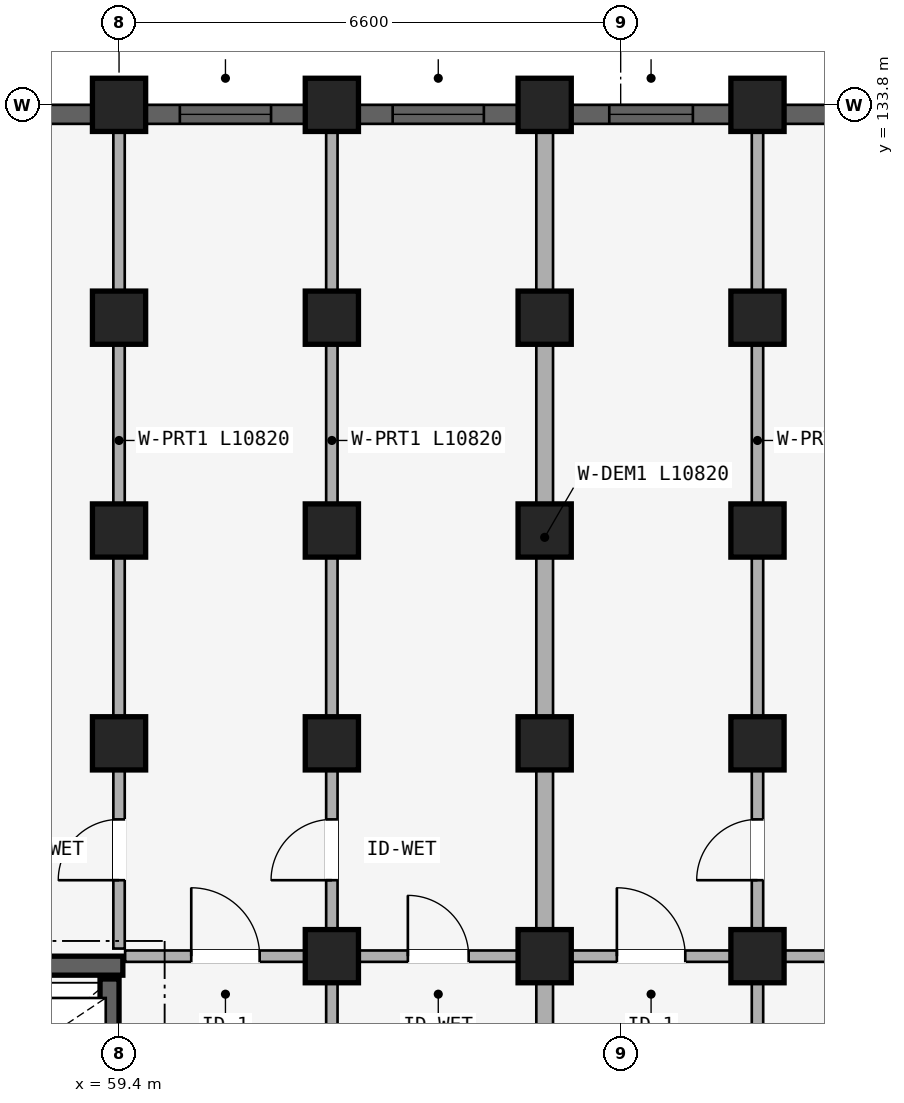
"""IFC4 building model, lengths in metres.
Left out: names, types, materials, properties, quantities, classifications, styles, units other than length and angle.
Written with IfcOpenShell. Run it as: python <this file> out.ifc"""

import sys

from ifc_helpers import new_model, si_unit, direction, frame, frame_2d, origin, origin_2d, place, context, subcontext, project, spatial, rectangle, extrude, element, fill, save


model = new_model("IFC4")
c1 = context("Model", 3, precision=1e-05, world=origin(), true_north=direction((0.0, 1.0)))
c2 = subcontext(c1, "Body", "Model", "MODEL_VIEW")
j1 = project(units=[si_unit("LENGTHUNIT", "METRE"), si_unit("PLANEANGLEUNIT", "RADIAN")], contexts=[c1])
p1 = place(None, origin())
s1 = spatial("IfcSite", under=j1, at=p1, CompositionType="ELEMENT")
p2 = place(p1, origin())
s2 = spatial("IfcBuilding", under=s1, at=p2, CompositionType="ELEMENT")
p3 = place(p2, frame((0.0, 0.0, 18.15)))
s3 = spatial("IfcBuildingStorey", under=s2, at=p3, CompositionType="ELEMENT", Elevation=18.15)
p4 = place(p3, frame((56.65, 122.475, 0.0), z_axis=(0.0, 0.0, 1.0), x_axis=(1.0, 0.0, 0.0)))
e1 = element("IfcWall", 1, at=p4, inside=s3, PredefinedType="SHEAR", context=c2, shape_type="SweptSolid", body=[
    extrude(rectangle(XDim=2.8, YDim=0.25, at=frame_2d((1.4, 0.0))), origin(), (0.0, 0.0, 1.0), 2.93),
])
p5 = place(p3, frame((59.275, 120.15, 0.0), z_axis=(0.0, 0.0, 1.0), x_axis=(0.0, 1.0, 0.0)))
e2 = element("IfcWall", 2, at=p5, inside=s3, PredefinedType="SHEAR", context=c2, shape_type="SweptSolid", body=[
    extrude(rectangle(XDim=2.15, YDim=0.25, at=frame_2d((1.075, 0.0))), origin(), (0.0, 0.0, 1.0), 2.93),
])
for number, where, z_axis, x_axis in (
    (3, (59.4, 125.4, 0.0), (0.0, 0.0, 1.0), (1.0, 0.0, 0.0)),
    (4, (59.4, 128.2, 0.0), (0.0, 0.0, 1.0), (1.0, 0.0, 0.0)),
    (5, (59.4, 131.0, 0.0), (0.0, 0.0, 1.0), (1.0, 0.0, 0.0)),
    (6, (59.4, 133.8, 0.0), (0.0, 0.0, 1.0), (1.0, 0.0, 0.0)),
    (7, (62.2, 122.6, 0.0), (0.0, 0.0, 1.0), (1.0, 0.0, 0.0)),
    (8, (62.2, 125.4, 0.0), (0.0, 0.0, 1.0), (1.0, 0.0, 0.0)),
    (9, (62.2, 128.2, 0.0), (0.0, 0.0, 1.0), (1.0, 0.0, 0.0)),
    (10, (62.2, 131.0, 0.0), (0.0, 0.0, 1.0), (1.0, 0.0, 0.0)),
    (11, (62.2, 133.8, 0.0), (0.0, 0.0, 1.0), (1.0, 0.0, 0.0)),
    (12, (65.0, 122.6, 0.0), (0.0, 0.0, 1.0), (1.0, 0.0, 0.0)),
    (13, (65.0, 125.4, 0.0), (0.0, 0.0, 1.0), (1.0, 0.0, 0.0)),
    (14, (65.0, 128.2, 0.0), (0.0, 0.0, 1.0), (1.0, 0.0, 0.0)),
    (15, (65.0, 131.0, 0.0), (0.0, 0.0, 1.0), (1.0, 0.0, 0.0)),
    (16, (65.0, 133.8, 0.0), (0.0, 0.0, 1.0), (1.0, 0.0, 0.0)),
    (17, (67.8, 122.6, 0.0), (0.0, 0.0, 1.0), (1.0, 0.0, 0.0)),
    (18, (67.8, 125.4, 0.0), (0.0, 0.0, 1.0), (1.0, 0.0, 0.0)),
    (19, (67.8, 128.2, 0.0), (0.0, 0.0, 1.0), (1.0, 0.0, 0.0)),
    (20, (67.8, 131.0, 0.0), (0.0, 0.0, 1.0), (1.0, 0.0, 0.0)),
    (21, (67.8, 133.8, 0.0), (0.0, 0.0, 1.0), (1.0, 0.0, 0.0)),
):
    element("IfcColumn", number, at=place(p3, frame(where, z_axis=z_axis, x_axis=x_axis)), inside=s3, PredefinedType="COLUMN", context=c2, shape_type="SweptSolid", body=[
        extrude(rectangle(XDim=0.7, YDim=0.7, at=origin_2d()), origin(), (0.0, 0.0, 1.0), 2.93),
    ])
p6 = place(p3, frame((59.48, 122.6, 0.0), z_axis=(0.0, 0.0, 1.0), x_axis=(1.0, 0.0, 0.0)))
e22 = element("IfcWall", 22, at=p6, inside=s3, PredefinedType="PLUMBINGWALL", context=c2, shape_type="SweptSolid", body=[
    extrude(rectangle(XDim=2.64, YDim=0.15, at=frame_2d((1.32, 0.0))), origin(), (0.0, 0.0, 1.0), 2.372),
])
p7 = place(p6, frame((0.87, 0.0, 0.0)))
e23 = element("IfcOpeningElement", 23, at=p7, cuts=e22, PredefinedType="OPENING", context=c2, shape_type="SweptSolid", body=[
    extrude(rectangle(XDim=0.9, YDim=2.1, at=frame_2d((0.45, 1.05))), frame((0.0, 0.085, 0.0), z_axis=(0.0, -1.0, 0.0), x_axis=(1.0, 0.0, 0.0)), (0.0, 0.0, 1.0), 0.17),
])
p8 = place(p3, frame((62.28, 122.6, 0.0), z_axis=(0.0, 0.0, 1.0), x_axis=(1.0, 0.0, 0.0)))
e24 = element("IfcWall", 24, at=p8, inside=s3, PredefinedType="PLUMBINGWALL", context=c2, shape_type="SweptSolid", body=[
    extrude(rectangle(XDim=2.64, YDim=0.15, at=frame_2d((1.32, 0.0))), origin(), (0.0, 0.0, 1.0), 2.372),
])
p9 = place(p8, frame((0.92, 0.0, 0.0)))
e25 = element("IfcOpeningElement", 25, at=p9, cuts=e24, PredefinedType="OPENING", context=c2, shape_type="SweptSolid", body=[
    extrude(rectangle(XDim=0.8, YDim=2.1, at=frame_2d((0.4, 1.05))), frame((0.0, 0.085, 0.0), z_axis=(0.0, -1.0, 0.0), x_axis=(1.0, 0.0, 0.0)), (0.0, 0.0, 1.0), 0.17),
])
p10 = place(p3, frame((65.08, 122.6, 0.0), z_axis=(0.0, 0.0, 1.0), x_axis=(1.0, 0.0, 0.0)))
e26 = element("IfcWall", 26, at=p10, inside=s3, PredefinedType="PLUMBINGWALL", context=c2, shape_type="SweptSolid", body=[
    extrude(rectangle(XDim=2.64, YDim=0.15, at=frame_2d((1.32, 0.0))), origin(), (0.0, 0.0, 1.0), 2.372),
])
p11 = place(p10, frame((0.87, 0.0, 0.0)))
e27 = element("IfcOpeningElement", 27, at=p11, cuts=e26, PredefinedType="OPENING", context=c2, shape_type="SweptSolid", body=[
    extrude(rectangle(XDim=0.9, YDim=2.1, at=frame_2d((0.45, 1.05))), frame((0.0, 0.085, 0.0), z_axis=(0.0, -1.0, 0.0), x_axis=(1.0, 0.0, 0.0)), (0.0, 0.0, 1.0), 0.17),
])
p12 = place(p3, frame((67.88, 122.6, 0.0), z_axis=(0.0, 0.0, 1.0), x_axis=(1.0, 0.0, 0.0)))
e28 = element("IfcWall", 28, at=p12, inside=s3, PredefinedType="PLUMBINGWALL", context=c2, shape_type="SweptSolid", body=[
    extrude(rectangle(XDim=2.64, YDim=0.15, at=frame_2d((1.32, 0.0))), origin(), (0.0, 0.0, 1.0), 2.372),
])
p13 = place(p12, frame((0.92, 0.0, 0.0)))
e29 = element("IfcOpeningElement", 29, at=p13, cuts=e28, PredefinedType="OPENING", context=c2, shape_type="SweptSolid", body=[
    extrude(rectangle(XDim=0.8, YDim=2.1, at=frame_2d((0.4, 1.05))), frame((0.0, 0.085, 0.0), z_axis=(0.0, -1.0, 0.0), x_axis=(1.0, 0.0, 0.0)), (0.0, 0.0, 1.0), 0.17),
])
p14 = place(p3, frame((59.4, 122.7, 0.0), z_axis=(0.0, 0.0, 1.0), x_axis=(0.0, 1.0, 0.0)))
e30 = element("IfcWall", 30, at=p14, inside=s3, PredefinedType="PARTITIONING", context=c2, shape_type="SweptSolid", body=[
    extrude(rectangle(XDim=10.82, YDim=0.15, at=frame_2d((5.41, 0.0))), origin(), (0.0, 0.0, 1.0), 2.372),
])
p15 = place(p14, frame((0.899, 0.0, 0.0)))
e31 = element("IfcOpeningElement", 31, at=p15, cuts=e30, PredefinedType="OPENING", context=c2, shape_type="SweptSolid", body=[
    extrude(rectangle(XDim=0.8, YDim=2.1, at=frame_2d((0.4, 1.05))), frame((0.0, 0.085, 0.0), z_axis=(0.0, -1.0, 0.0), x_axis=(1.0, 0.0, 0.0)), (0.0, 0.0, 1.0), 0.17),
])
p16 = place(p3, frame((62.2, 116.05, 0.0), z_axis=(0.0, 0.0, 1.0), x_axis=(0.0, 1.0, 0.0)))
e32 = element("IfcWall", 32, at=p16, inside=s3, PredefinedType="PARTITIONING", context=c2, shape_type="SweptSolid", body=[
    extrude(rectangle(XDim=6.53, YDim=0.15, at=frame_2d((3.265, 0.0))), origin(), (0.0, 0.0, 1.0), 2.372),
])
p17 = place(p16, frame((2.815, 0.0, 0.0)))
e33 = element("IfcOpeningElement", 33, at=p17, cuts=e32, PredefinedType="OPENING", context=c2, shape_type="SweptSolid", body=[
    extrude(rectangle(XDim=0.9, YDim=2.1, at=frame_2d((0.45, 1.05))), frame((0.0, 0.085, 0.0), z_axis=(0.0, -1.0, 0.0), x_axis=(1.0, 0.0, 0.0)), (0.0, 0.0, 1.0), 0.17),
])
p18 = place(p3, frame((62.2, 122.7, 0.0), z_axis=(0.0, 0.0, 1.0), x_axis=(0.0, 1.0, 0.0)))
e34 = element("IfcWall", 34, at=p18, inside=s3, PredefinedType="PARTITIONING", context=c2, shape_type="SweptSolid", body=[
    extrude(rectangle(XDim=10.82, YDim=0.15, at=frame_2d((5.41, 0.0))), origin(), (0.0, 0.0, 1.0), 2.372),
])
p19 = place(p18, frame((0.899, 0.0, 0.0)))
e35 = element("IfcOpeningElement", 35, at=p19, cuts=e34, PredefinedType="OPENING", context=c2, shape_type="SweptSolid", body=[
    extrude(rectangle(XDim=0.8, YDim=2.1, at=frame_2d((0.4, 1.05))), frame((0.0, 0.085, 0.0), z_axis=(0.0, -1.0, 0.0), x_axis=(1.0, 0.0, 0.0)), (0.0, 0.0, 1.0), 0.17),
])
p20 = place(p3, frame((65.0, 116.05, 0.0), z_axis=(0.0, 0.0, 1.0), x_axis=(0.0, 1.0, 0.0)))
e36 = element("IfcWall", 36, at=p20, inside=s3, PredefinedType="STANDARD", context=c2, shape_type="SweptSolid", body=[
    extrude(rectangle(XDim=6.53, YDim=0.22, at=frame_2d((3.265, 0.0))), origin(), (0.0, 0.0, 1.0), 2.372),
])
p21 = place(p3, frame((65.0, 122.7, 0.0), z_axis=(0.0, 0.0, 1.0), x_axis=(0.0, 1.0, 0.0)))
e37 = element("IfcWall", 37, at=p21, inside=s3, PredefinedType="STANDARD", context=c2, shape_type="SweptSolid", body=[
    extrude(rectangle(XDim=10.82, YDim=0.22, at=frame_2d((5.41, 0.0))), origin(), (0.0, 0.0, 1.0), 2.372),
])
p22 = place(p3, frame((67.8, 116.05, 0.0), z_axis=(0.0, 0.0, 1.0), x_axis=(0.0, 1.0, 0.0)))
e38 = element("IfcWall", 38, at=p22, inside=s3, PredefinedType="PARTITIONING", context=c2, shape_type="SweptSolid", body=[
    extrude(rectangle(XDim=6.53, YDim=0.15, at=frame_2d((3.265, 0.0))), origin(), (0.0, 0.0, 1.0), 2.372),
])
p23 = place(p22, frame((2.815, 0.0, 0.0)))
e39 = element("IfcOpeningElement", 39, at=p23, cuts=e38, PredefinedType="OPENING", context=c2, shape_type="SweptSolid", body=[
    extrude(rectangle(XDim=0.9, YDim=2.1, at=frame_2d((0.45, 1.05))), frame((0.0, 0.085, 0.0), z_axis=(0.0, -1.0, 0.0), x_axis=(1.0, 0.0, 0.0)), (0.0, 0.0, 1.0), 0.17),
])
p24 = place(p3, frame((67.8, 122.7, 0.0), z_axis=(0.0, 0.0, 1.0), x_axis=(0.0, 1.0, 0.0)))
e40 = element("IfcWall", 40, at=p24, inside=s3, PredefinedType="PARTITIONING", context=c2, shape_type="SweptSolid", body=[
    extrude(rectangle(XDim=10.82, YDim=0.15, at=frame_2d((5.41, 0.0))), origin(), (0.0, 0.0, 1.0), 2.372),
])
p25 = place(p24, frame((0.899, 0.0, 0.0)))
e41 = element("IfcOpeningElement", 41, at=p25, cuts=e40, PredefinedType="OPENING", context=c2, shape_type="SweptSolid", body=[
    extrude(rectangle(XDim=0.8, YDim=2.1, at=frame_2d((0.4, 1.05))), frame((0.0, 0.085, 0.0), z_axis=(0.0, -1.0, 0.0), x_axis=(1.0, 0.0, 0.0)), (0.0, 0.0, 1.0), 0.17),
])
p26 = place(p3, frame((54.154, 133.675, 0.0), z_axis=(0.0, 0.0, 1.0), x_axis=(1.0, 0.0, 0.0)))
e42 = element("IfcWall", 42, at=p26, inside=s3, PredefinedType="STANDARD", context=c2, shape_type="SweptSolid", body=[
    extrude(rectangle(XDim=4.893, YDim=0.25, at=frame_2d((2.446, 0.0))), origin(), (0.0, 0.0, 1.0), 2.472),
])
p27 = place(p26, frame((1.971, 0.0, 0.88)))
e43 = element("IfcOpeningElement", 43, at=p27, cuts=e42, PredefinedType="OPENING", context=c2, shape_type="SweptSolid", body=[
    extrude(rectangle(XDim=0.95, YDim=1.35, at=frame_2d((0.475, 0.675))), frame((0.0, 0.135, 0.0), z_axis=(0.0, -1.0, 0.0), x_axis=(1.0, 0.0, 0.0)), (0.0, 0.0, 1.0), 0.27),
])
p28 = place(p3, frame((59.753, 133.675, 0.0), z_axis=(0.0, 0.0, 1.0), x_axis=(1.0, 0.0, 0.0)))
e44 = element("IfcWall", 44, at=p28, inside=s3, PredefinedType="STANDARD", context=c2, shape_type="SweptSolid", body=[
    extrude(rectangle(XDim=2.093, YDim=0.25, at=frame_2d((1.046, 0.0))), origin(), (0.0, 0.0, 1.0), 2.472),
])
p29 = place(p28, frame((0.447, 0.0, 0.772)))
e45 = element("IfcOpeningElement", 45, at=p29, cuts=e44, PredefinedType="OPENING", context=c2, shape_type="SweptSolid", body=[
    extrude(rectangle(XDim=1.2, YDim=1.5, at=frame_2d((0.6, 0.75))), frame((0.0, 0.135, 0.0), z_axis=(0.0, -1.0, 0.0), x_axis=(1.0, 0.0, 0.0)), (0.0, 0.0, 1.0), 0.27),
])
p30 = place(p3, frame((62.553, 133.675, 0.0), z_axis=(0.0, 0.0, 1.0), x_axis=(1.0, 0.0, 0.0)))
e46 = element("IfcWall", 46, at=p30, inside=s3, PredefinedType="STANDARD", context=c2, shape_type="SweptSolid", body=[
    extrude(rectangle(XDim=2.093, YDim=0.25, at=frame_2d((1.046, 0.0))), origin(), (0.0, 0.0, 1.0), 2.472),
])
p31 = place(p30, frame((0.447, 0.0, 0.772)))
e47 = element("IfcOpeningElement", 47, at=p31, cuts=e46, PredefinedType="OPENING", context=c2, shape_type="SweptSolid", body=[
    extrude(rectangle(XDim=1.2, YDim=1.5, at=frame_2d((0.6, 0.75))), frame((0.0, 0.135, 0.0), z_axis=(0.0, -1.0, 0.0), x_axis=(1.0, 0.0, 0.0)), (0.0, 0.0, 1.0), 0.27),
])
p32 = place(p3, frame((65.354, 133.675, 0.0), z_axis=(0.0, 0.0, 1.0), x_axis=(1.0, 0.0, 0.0)))
e48 = element("IfcWall", 48, at=p32, inside=s3, PredefinedType="STANDARD", context=c2, shape_type="SweptSolid", body=[
    extrude(rectangle(XDim=2.093, YDim=0.25, at=frame_2d((1.046, 0.0))), origin(), (0.0, 0.0, 1.0), 2.472),
])
p33 = place(p32, frame((0.497, 0.0, 0.822)))
e49 = element("IfcOpeningElement", 49, at=p33, cuts=e48, PredefinedType="OPENING", context=c2, shape_type="SweptSolid", body=[
    extrude(rectangle(XDim=1.1, YDim=1.45, at=frame_2d((0.55, 0.725))), frame((0.0, 0.135, 0.0), z_axis=(0.0, -1.0, 0.0), x_axis=(1.0, 0.0, 0.0)), (0.0, 0.0, 1.0), 0.27),
])
p34 = place(p3, frame((68.154, 133.675, 0.0), z_axis=(0.0, 0.0, 1.0), x_axis=(1.0, 0.0, 0.0)))
e50 = element("IfcWall", 50, at=p34, inside=s3, PredefinedType="STANDARD", context=c2, shape_type="SweptSolid", body=[
    extrude(rectangle(XDim=2.093, YDim=0.25, at=frame_2d((1.046, 0.0))), origin(), (0.0, 0.0, 1.0), 2.472),
])
p35 = place(p34, frame((0.572, 0.0, 0.88)))
e51 = element("IfcOpeningElement", 51, at=p35, cuts=e50, PredefinedType="OPENING", context=c2, shape_type="SweptSolid", body=[
    extrude(rectangle(XDim=0.95, YDim=1.35, at=frame_2d((0.475, 0.675))), frame((0.0, 0.135, 0.0), z_axis=(0.0, -1.0, 0.0), x_axis=(1.0, 0.0, 0.0)), (0.0, 0.0, 1.0), 0.27),
])
p36 = place(p29, origin())
e52 = element("IfcWindow", 52, at=p36, inside=s3, PartitioningType="SINGLE_PANEL", PredefinedType="WINDOW", context=c2, shape_type="SweptSolid", body=[
    extrude(rectangle(XDim=1.2, YDim=1.5, at=frame_2d((0.6, 0.75))), frame((0.0, 0.03, 0.0), z_axis=(0.0, -1.0, 0.0), x_axis=(1.0, 0.0, 0.0)), (0.0, 0.0, 1.0), 0.06),
])
fill(e45, e52)
p37 = place(p31, origin())
e53 = element("IfcWindow", 53, at=p37, inside=s3, PartitioningType="SINGLE_PANEL", PredefinedType="WINDOW", context=c2, shape_type="SweptSolid", body=[
    extrude(rectangle(XDim=1.2, YDim=1.5, at=frame_2d((0.6, 0.75))), frame((0.0, 0.03, 0.0), z_axis=(0.0, -1.0, 0.0), x_axis=(1.0, 0.0, 0.0)), (0.0, 0.0, 1.0), 0.06),
])
fill(e47, e53)
p38 = place(p33, origin())
e54 = element("IfcWindow", 54, at=p38, inside=s3, PartitioningType="SINGLE_PANEL", PredefinedType="WINDOW", context=c2, shape_type="SweptSolid", body=[
    extrude(rectangle(XDim=1.1, YDim=1.45, at=frame_2d((0.55, 0.725))), frame((0.0, 0.03, 0.0), z_axis=(0.0, -1.0, 0.0), x_axis=(1.0, 0.0, 0.0)), (0.0, 0.0, 1.0), 0.06),
])
fill(e49, e54)
p39 = place(p7, origin())
e55 = element("IfcDoor", 55, at=p39, inside=s3, OperationType="SINGLE_SWING_LEFT", PredefinedType="DOOR", context=c2, shape_type="SweptSolid", body=[
    extrude(rectangle(XDim=0.9, YDim=2.1, at=frame_2d((0.45, 1.05))), frame((0.0, 0.025, 0.0), z_axis=(0.0, -1.0, 0.0), x_axis=(1.0, 0.0, 0.0)), (0.0, 0.0, 1.0), 0.05),
])
fill(e23, e55)
p40 = place(p9, origin())
e56 = element("IfcDoor", 56, at=p40, inside=s3, OperationType="SINGLE_SWING_LEFT", PredefinedType="DOOR", context=c2, shape_type="SweptSolid", body=[
    extrude(rectangle(XDim=0.8, YDim=2.1, at=frame_2d((0.4, 1.05))), frame((0.0, 0.025, 0.0), z_axis=(0.0, -1.0, 0.0), x_axis=(1.0, 0.0, 0.0)), (0.0, 0.0, 1.0), 0.05),
])
fill(e25, e56)
p41 = place(p11, origin())
e57 = element("IfcDoor", 57, at=p41, inside=s3, OperationType="SINGLE_SWING_LEFT", PredefinedType="DOOR", context=c2, shape_type="SweptSolid", body=[
    extrude(rectangle(XDim=0.9, YDim=2.1, at=frame_2d((0.45, 1.05))), frame((0.0, 0.025, 0.0), z_axis=(0.0, -1.0, 0.0), x_axis=(1.0, 0.0, 0.0)), (0.0, 0.0, 1.0), 0.05),
])
fill(e27, e57)
p42 = place(p15, frame((0.8, 0.0, 0.0), z_axis=(0.0, 0.0, 1.0), x_axis=(-1.0, 0.0, 0.0)))
e58 = element("IfcDoor", 58, at=p42, inside=s3, OperationType="SINGLE_SWING_RIGHT", PredefinedType="DOOR", context=c2, shape_type="SweptSolid", body=[
    extrude(rectangle(XDim=0.8, YDim=2.1, at=frame_2d((0.4, 1.05))), frame((0.0, 0.025, 0.0), z_axis=(0.0, -1.0, 0.0), x_axis=(1.0, 0.0, 0.0)), (0.0, 0.0, 1.0), 0.05),
])
fill(e31, e58)
p43 = place(p19, origin())
e59 = element("IfcDoor", 59, at=p43, inside=s3, OperationType="SINGLE_SWING_LEFT", PredefinedType="DOOR", context=c2, shape_type="SweptSolid", body=[
    extrude(rectangle(XDim=0.8, YDim=2.1, at=frame_2d((0.4, 1.05))), frame((0.0, 0.025, 0.0), z_axis=(0.0, -1.0, 0.0), x_axis=(1.0, 0.0, 0.0)), (0.0, 0.0, 1.0), 0.05),
])
fill(e35, e59)
p44 = place(p25, frame((0.8, 0.0, 0.0), z_axis=(0.0, 0.0, 1.0), x_axis=(-1.0, 0.0, 0.0)))
e60 = element("IfcDoor", 60, at=p44, inside=s3, OperationType="SINGLE_SWING_RIGHT", PredefinedType="DOOR", context=c2, shape_type="SweptSolid", body=[
    extrude(rectangle(XDim=0.8, YDim=2.1, at=frame_2d((0.4, 1.05))), frame((0.0, 0.025, 0.0), z_axis=(0.0, -1.0, 0.0), x_axis=(1.0, 0.0, 0.0)), (0.0, 0.0, 1.0), 0.05),
])
fill(e41, e60)
save(model, sys.argv[1])
